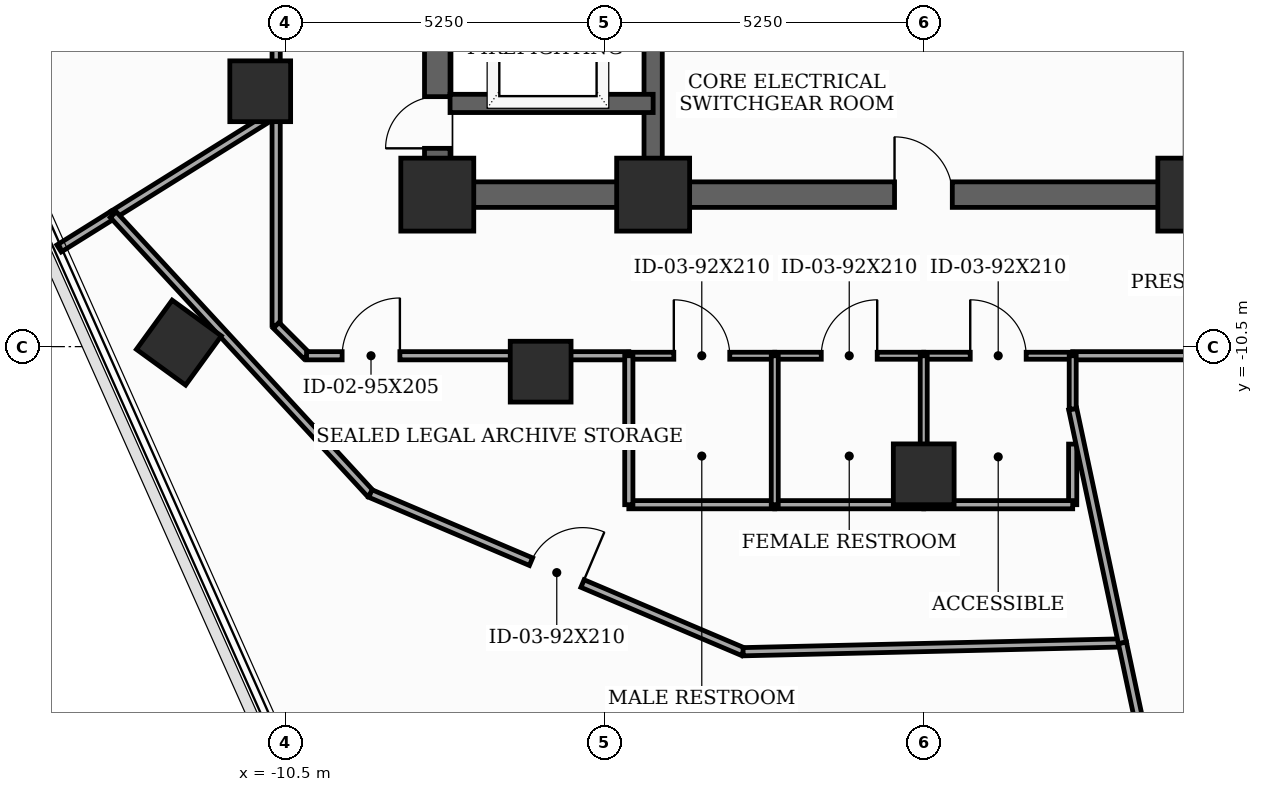
"""IFC4 building model, lengths in metres.
Left out: names, types, materials, properties, quantities, classifications, styles, units other than length and angle.
Written with IfcOpenShell. Run it as: python <this file> out.ifc"""

import sys

from ifc_helpers import new_model, si_unit, direction, frame, frame_2d, origin, origin_2d, place, context, subcontext, project, spatial, rectangle, extrude, element, fill, save


model = new_model("IFC4")
c1 = context("Model", 3, precision=1e-05, world=origin(), true_north=direction((0.0, 1.0)))
c2 = subcontext(c1, "Body", "Model", "MODEL_VIEW")
j1 = project(units=[si_unit("LENGTHUNIT", "METRE"), si_unit("PLANEANGLEUNIT", "RADIAN")], contexts=[c1])
p1 = place(None, origin())
s1 = spatial("IfcSite", under=j1, at=p1, CompositionType="ELEMENT")
p2 = place(p1, origin())
s2 = spatial("IfcBuilding", under=s1, at=p2, CompositionType="ELEMENT")
p3 = place(p2, frame((0.0, 0.0, 222.6)))
s3 = spatial("IfcBuildingStorey", under=s2, at=p3, CompositionType="ELEMENT", Elevation=222.6)
for number, where, z_axis, x_axis in (
    (1, (-8.0, -8.0, 0.0), (0.0, 0.0, 1.0), (1.0, 0.0, 0.0)),
    (2, (-4.45, -8.0, 0.0), (0.0, 0.0, 1.0), (1.0, 0.0, 0.0)),
    (3, (4.45, -8.0, 0.0), (0.0, 0.0, 1.0), (1.0, 0.0, 0.0)),
):
    element("IfcColumn", number, at=place(p3, frame(where, z_axis=z_axis, x_axis=x_axis)), inside=s3, PredefinedType="COLUMN", context=c2, shape_type="SweptSolid", body=[
        extrude(rectangle(XDim=1.2, YDim=1.2, at=origin_2d()), origin(), (0.0, 0.0, 1.0), 3.7),
    ])
for number, where, z_axis, x_axis in (
    (4, (-10.912, -6.3, 0.0), (0.0, 0.0, 1.0), (1.0, 0.0, 0.0)),
    (5, (-6.3, -10.912, 0.0), (0.0, 0.0, 1.0), (1.0, 0.0, 0.0)),
    (6, (0.0, -12.6, 0.0), (0.0, 0.0, 1.0), (1.0, 0.0, 0.0)),
    (7, (-12.25, -10.435, 0.0), (0.0, 0.0, 1.0), (0.588, 0.809, 0.0)),
):
    element("IfcColumn", number, at=place(p3, frame(where, z_axis=z_axis, x_axis=x_axis)), inside=s3, PredefinedType="COLUMN", context=c2, shape_type="SweptSolid", body=[
        extrude(rectangle(XDim=1.0, YDim=1.0, at=origin_2d()), origin(), (0.0, 0.0, 1.0), 3.7),
    ])
p4 = place(p3, frame((-8.0, -8.0, 0.0), z_axis=(0.0, 0.0, 1.0), x_axis=(0.0, 1.0, 0.0)))
e8 = element("IfcWall", 8, at=p4, inside=s3, PredefinedType="SHEAR", context=c2, shape_type="SweptSolid", body=[
    extrude(rectangle(XDim=16.0, YDim=0.42, at=frame_2d((8.0, 0.0))), origin(), (0.0, 0.0, 1.0), 3.5),
])
p5 = place(p4, frame((0.761, 0.0, 0.0)))
e9 = element("IfcOpeningElement", 9, at=p5, cuts=e8, PredefinedType="OPENING", context=c2, shape_type="SweptSolid", body=[
    extrude(rectangle(XDim=0.85, YDim=2.02, at=frame_2d((0.425, 1.01))), frame((0.0, 0.22, 0.0), z_axis=(0.0, -1.0, 0.0), x_axis=(1.0, 0.0, 0.0)), (0.0, 0.0, 1.0), 0.44),
])
p6 = place(p4, frame((5.35, 0.0, 0.0)))
e10 = element("IfcOpeningElement", 10, at=p6, cuts=e8, PredefinedType="OPENING", context=c2, shape_type="SweptSolid", body=[
    extrude(rectangle(XDim=1.05, YDim=2.15, at=frame_2d((0.525, 1.075))), frame((0.0, 0.22, 0.0), z_axis=(0.0, -1.0, 0.0), x_axis=(1.0, 0.0, 0.0)), (0.0, 0.0, 1.0), 0.44),
])
p7 = place(p3, frame((-8.0, -8.0, 0.0), z_axis=(0.0, 0.0, 1.0), x_axis=(1.0, 0.0, 0.0)))
e11 = element("IfcWall", 11, at=p7, inside=s3, PredefinedType="SHEAR", context=c2, shape_type="SweptSolid", body=[
    extrude(rectangle(XDim=16.0, YDim=0.42, at=frame_2d((8.0, 0.0))), origin(), (0.0, 0.0, 1.0), 3.5),
])
p8 = place(p7, frame((7.52, 0.0, 0.0)))
e12 = element("IfcOpeningElement", 12, at=p8, cuts=e11, PredefinedType="OPENING", context=c2, shape_type="SweptSolid", body=[
    extrude(rectangle(XDim=0.95, YDim=2.1, at=frame_2d((0.475, 1.05))), frame((0.0, 0.22, 0.0), z_axis=(0.0, -1.0, 0.0), x_axis=(1.0, 0.0, 0.0)), (0.0, 0.0, 1.0), 0.44),
])
p9 = place(p3, frame((-4.45, -7.79, 0.0), z_axis=(0.0, 0.0, 1.0), x_axis=(0.0, 1.0, 0.0)))
e13 = element("IfcWall", 13, at=p9, inside=s3, PredefinedType="SHEAR", context=c2, shape_type="SweptSolid", body=[
    extrude(rectangle(XDim=15.58, YDim=0.3, at=frame_2d((7.79, 0.0))), origin(), (0.0, 0.0, 1.0), 3.5),
])
p10 = place(p3, frame((-7.79, -6.5, 0.0), z_axis=(0.0, 0.0, 1.0), x_axis=(1.0, 0.0, 0.0)))
e14 = element("IfcWall", 14, at=p10, inside=s3, PredefinedType="SHEAR", context=c2, shape_type="SweptSolid", body=[
    extrude(rectangle(XDim=3.34, YDim=0.3, at=frame_2d((1.67, 0.0))), origin(), (0.0, 0.0, 1.0), 3.5),
])
p11 = place(p3, frame((-10.65, -4.225, 0.0), z_axis=(0.0, 0.0, 1.0), x_axis=(0.0, -1.0, 0.0)))
e15 = element("IfcWall", 15, at=p11, inside=s3, PredefinedType="PARTITIONING", context=c2, shape_type="SweptSolid", body=[
    extrude(rectangle(XDim=2.43, YDim=0.135, at=frame_2d((1.215, 0.0))), origin(), (0.0, 0.0, 1.0), 2.885),
])
p12 = place(p3, frame((-10.65, -6.655, 0.0), z_axis=(0.0, 0.0, 1.0), x_axis=(0.0, -1.0, 0.0)))
e16 = element("IfcWall", 16, at=p12, inside=s3, PredefinedType="PARTITIONING", context=c2, shape_type="SweptSolid", body=[
    extrude(rectangle(XDim=3.495, YDim=0.135, at=frame_2d((1.748, 0.0))), origin(), (0.0, 0.0, 1.0), 2.885),
])
p13 = place(p3, frame((-10.65, -10.15, 0.0), z_axis=(0.0, 0.0, 1.0), x_axis=(0.707106781187, -0.707106781187, 0.0)))
e17 = element("IfcWall", 17, at=p13, inside=s3, PredefinedType="PARTITIONING", context=c2, shape_type="SweptSolid", body=[
    extrude(rectangle(XDim=0.707, YDim=0.135, at=frame_2d((0.354, 0.0))), origin(), (0.0, 0.0, 1.0), 2.075),
])
p14 = place(p3, frame((-10.15, -10.65, 0.0), z_axis=(0.0, 0.0, 1.0), x_axis=(1.0, 0.0, 0.0)))
e18 = element("IfcWall", 18, at=p14, inside=s3, PredefinedType="PARTITIONING", context=c2, shape_type="SweptSolid", body=[
    extrude(rectangle(XDim=5.3, YDim=0.135, at=frame_2d((2.65, 0.0))), origin(), (0.0, 0.0, 1.0), 2.075),
])
p15 = place(p14, frame((0.585, 0.0, 0.0)))
e19 = element("IfcOpeningElement", 19, at=p15, cuts=e18, PredefinedType="OPENING", context=c2, shape_type="SweptSolid", body=[
    extrude(rectangle(XDim=0.95, YDim=2.025, at=frame_2d((0.475, 1.012))), frame((0.0, 0.077, 0.0), z_axis=(0.0, -1.0, 0.0), x_axis=(1.0, 0.0, 0.0)), (0.0, 0.0, 1.0), 0.155),
])
p16 = place(p3, frame((-4.85, -10.65, 0.0), z_axis=(0.0, 0.0, 1.0), x_axis=(1.0, 0.0, 0.0)))
e20 = element("IfcWall", 20, at=p16, inside=s3, PredefinedType="PARTITIONING", context=c2, shape_type="SweptSolid", body=[
    extrude(rectangle(XDim=2.4, YDim=0.115, at=frame_2d((1.2, 0.0))), origin(), (0.0, 0.0, 1.0), 3.5),
])
p17 = place(p16, frame((0.74, 0.0, 0.0)))
e21 = element("IfcOpeningElement", 21, at=p17, cuts=e20, PredefinedType="OPENING", context=c2, shape_type="SweptSolid", body=[
    extrude(rectangle(XDim=0.92, YDim=2.1, at=frame_2d((0.46, 1.05))), frame((0.0, 0.067, 0.0), z_axis=(0.0, -1.0, 0.0), x_axis=(1.0, 0.0, 0.0)), (0.0, 0.0, 1.0), 0.135),
])
p18 = place(p3, frame((-2.45, -10.65, 0.0), z_axis=(0.0, 0.0, 1.0), x_axis=(1.0, 0.0, 0.0)))
e22 = element("IfcWall", 22, at=p18, inside=s3, PredefinedType="PARTITIONING", context=c2, shape_type="SweptSolid", body=[
    extrude(rectangle(XDim=2.45, YDim=0.115, at=frame_2d((1.225, 0.0))), origin(), (0.0, 0.0, 1.0), 2.885),
])
p19 = place(p18, frame((0.765, 0.0, 0.0)))
e23 = element("IfcOpeningElement", 23, at=p19, cuts=e22, PredefinedType="OPENING", context=c2, shape_type="SweptSolid", body=[
    extrude(rectangle(XDim=0.92, YDim=2.1, at=frame_2d((0.46, 1.05))), frame((0.0, 0.067, 0.0), z_axis=(0.0, -1.0, 0.0), x_axis=(1.0, 0.0, 0.0)), (0.0, 0.0, 1.0), 0.135),
])
p20 = place(p3, frame((0.0, -10.65, 0.0), z_axis=(0.0, 0.0, 1.0), x_axis=(1.0, 0.0, 0.0)))
e24 = element("IfcWall", 24, at=p20, inside=s3, PredefinedType="PARTITIONING", context=c2, shape_type="SweptSolid", body=[
    extrude(rectangle(XDim=2.45, YDim=0.115, at=frame_2d((1.225, 0.0))), origin(), (0.0, 0.0, 1.0), 3.5),
])
p21 = place(p20, frame((0.765, 0.0, 0.0)))
e25 = element("IfcOpeningElement", 25, at=p21, cuts=e24, PredefinedType="OPENING", context=c2, shape_type="SweptSolid", body=[
    extrude(rectangle(XDim=0.92, YDim=2.1, at=frame_2d((0.46, 1.05))), frame((0.0, 0.067, 0.0), z_axis=(0.0, -1.0, 0.0), x_axis=(1.0, 0.0, 0.0)), (0.0, 0.0, 1.0), 0.135),
])
p22 = place(p3, frame((2.45, -10.65, 0.0), z_axis=(0.0, 0.0, 1.0), x_axis=(1.0, 0.0, 0.0)))
e26 = element("IfcWall", 26, at=p22, inside=s3, PredefinedType="PARTITIONING", context=c2, shape_type="SweptSolid", body=[
    extrude(rectangle(XDim=7.7, YDim=0.135, at=frame_2d((3.85, 0.0))), origin(), (0.0, 0.0, 1.0), 2.885),
])
p23 = place(p3, frame((-13.329, -8.329, 0.0), z_axis=(0.0, 0.0, 1.0), x_axis=(0.848059079617, 0.529901686617, 0.0)))
e27 = element("IfcWall", 27, at=p23, inside=s3, PredefinedType="PARTITIONING", context=c2, shape_type="SweptSolid", body=[
    extrude(rectangle(XDim=3.159, YDim=0.135, at=frame_2d((1.58, 0.0))), origin(), (0.0, 0.0, 1.0), 2.885),
])
p24 = place(p3, frame((-14.22, -8.885, 0.0), z_axis=(0.0, 0.0, 1.0), x_axis=(0.848337621773, 0.529455644493, 0.0)))
e28 = element("IfcWall", 28, at=p24, inside=s3, PredefinedType="PARTITIONING", context=c2, shape_type="SweptSolid", body=[
    extrude(rectangle(XDim=1.051, YDim=0.135, at=frame_2d((0.525, 0.0))), origin(), (0.0, 0.0, 1.0), 3.025),
])
p25 = place(p3, frame((-2.45, -13.1, 0.0), z_axis=(0.0, 0.0, 1.0), x_axis=(-1.0, 0.0, 0.0)))
e29 = element("IfcWall", 29, at=p25, inside=s3, PredefinedType="PARTITIONING", context=c2, shape_type="SweptSolid", body=[
    extrude(rectangle(XDim=2.4, YDim=0.135, at=frame_2d((1.2, 0.0))), origin(), (0.0, 0.0, 1.0), 3.5),
])
p26 = place(p3, frame((-4.85, -13.1, 0.0), z_axis=(0.0, 0.0, 1.0), x_axis=(0.0, 1.0, 0.0)))
e30 = element("IfcWall", 30, at=p26, inside=s3, PredefinedType="PARTITIONING", context=c2, shape_type="SweptSolid", body=[
    extrude(rectangle(XDim=2.45, YDim=0.135, at=frame_2d((1.225, 0.0))), origin(), (0.0, 0.0, 1.0), 2.885),
])
p27 = place(p3, frame((-13.329, -8.329, 0.0), z_axis=(0.0, 0.0, 1.0), x_axis=(0.677841155448, -0.735208384052, 0.0)))
e31 = element("IfcWall", 31, at=p27, inside=s3, PredefinedType="PARTITIONING", context=c2, shape_type="SweptSolid", body=[
    extrude(rectangle(XDim=6.239, YDim=0.135, at=frame_2d((3.12, 0.0))), origin(), (0.0, 0.0, 1.0), 2.075),
])
p28 = place(p3, frame((-9.1, -12.916, 0.0), z_axis=(0.0, 0.0, 1.0), x_axis=(0.920506675175, -0.390726836752, 0.0)))
e32 = element("IfcWall", 32, at=p28, inside=s3, PredefinedType="PARTITIONING", context=c2, shape_type="SweptSolid", body=[
    extrude(rectangle(XDim=6.659, YDim=0.135, at=frame_2d((3.33, 0.0))), origin(), (0.0, 0.0, 1.0), 2.985),
])
p29 = place(p28, frame((2.87, 0.0, 0.0)))
e33 = element("IfcOpeningElement", 33, at=p29, cuts=e32, PredefinedType="OPENING", context=c2, shape_type="SweptSolid", body=[
    extrude(rectangle(XDim=0.92, YDim=2.1, at=frame_2d((0.46, 1.05))), frame((0.0, 0.077, 0.0), z_axis=(0.0, -1.0, 0.0), x_axis=(1.0, 0.0, 0.0)), (0.0, 0.0, 1.0), 0.155),
])
p30 = place(p3, frame((-2.97, -15.518, 0.0), z_axis=(0.0, 0.0, 1.0), x_axis=(0.99972988351, 0.023241342836, 0.0)))
e34 = element("IfcWall", 34, at=p30, inside=s3, PredefinedType="PARTITIONING", context=c2, shape_type="SweptSolid", body=[
    extrude(rectangle(XDim=6.24, YDim=0.135, at=frame_2d((3.12, 0.0))), origin(), (0.0, 0.0, 1.0), 2.985),
])
p31 = place(p3, frame((0.0, -13.1, 0.0), z_axis=(0.0, 0.0, 1.0), x_axis=(-1.0, 0.0, 0.0)))
e35 = element("IfcWall", 35, at=p31, inside=s3, PredefinedType="PARTITIONING", context=c2, shape_type="SweptSolid", body=[
    extrude(rectangle(XDim=2.45, YDim=0.135, at=frame_2d((1.225, 0.0))), origin(), (0.0, 0.0, 1.0), 3.5),
])
p32 = place(p3, frame((2.45, -12.103, 0.0), z_axis=(0.0, 0.0, 1.0), x_axis=(0.0, -1.0, 0.0)))
e36 = element("IfcWall", 36, at=p32, inside=s3, PredefinedType="PARTITIONING", context=c2, shape_type="SweptSolid", body=[
    extrude(rectangle(XDim=0.997, YDim=0.135, at=frame_2d((0.499, 0.0))), origin(), (0.0, 0.0, 1.0), 2.885),
])
p33 = place(p3, frame((2.45, -13.1, 0.0), z_axis=(0.0, 0.0, 1.0), x_axis=(-1.0, 0.0, 0.0)))
e37 = element("IfcWall", 37, at=p33, inside=s3, PredefinedType="PARTITIONING", context=c2, shape_type="SweptSolid", body=[
    extrude(rectangle(XDim=2.45, YDim=0.135, at=frame_2d((1.225, 0.0))), origin(), (0.0, 0.0, 1.0), 2.985),
])
p34 = place(p3, frame((3.268, -15.373, 0.0), z_axis=(0.0, 0.0, 1.0), x_axis=(-0.208002774368, 0.978128235895, 0.0)))
e38 = element("IfcWall", 38, at=p34, inside=s3, PredefinedType="PARTITIONING", context=c2, shape_type="SweptSolid", body=[
    extrude(rectangle(XDim=3.933, YDim=0.135, at=frame_2d((1.967, 0.0))), origin(), (0.0, 0.0, 1.0), 2.885),
])
p35 = place(p3, frame((-2.45, -13.1, 0.0), z_axis=(0.0, 0.0, 1.0), x_axis=(0.0, 1.0, 0.0)))
e39 = element("IfcWall", 39, at=p35, inside=s3, PredefinedType="PARTITIONING", context=c2, shape_type="SweptSolid", body=[
    extrude(rectangle(XDim=2.45, YDim=0.115, at=frame_2d((1.225, 0.0))), origin(), (0.0, 0.0, 1.0), 2.885),
])
p36 = place(p3, frame((4.645, -21.856, 0.0), z_axis=(0.0, 0.0, 1.0), x_axis=(-0.207797956892, 0.978171768715, 0.0)))
e40 = element("IfcWall", 40, at=p36, inside=s3, PredefinedType="PARTITIONING", context=c2, shape_type="SweptSolid", body=[
    extrude(rectangle(XDim=6.628, YDim=0.135, at=frame_2d((3.314, 0.0))), origin(), (0.0, 0.0, 1.0), 2.985),
])
p37 = place(p3, frame((0.0, -13.1, 0.0), z_axis=(0.0, 0.0, 1.0), x_axis=(0.0, 1.0, 0.0)))
e41 = element("IfcWall", 41, at=p37, inside=s3, PredefinedType="PARTITIONING", context=c2, shape_type="SweptSolid", body=[
    extrude(rectangle(XDim=2.45, YDim=0.115, at=frame_2d((1.225, 0.0))), origin(), (0.0, 0.0, 1.0), 2.885),
])
p38 = place(p3, frame((2.45, -11.526, 0.0), z_axis=(0.0, 0.0, 1.0), x_axis=(0.0, 1.0, 0.0)))
e42 = element("IfcWall", 42, at=p38, inside=s3, PredefinedType="PARTITIONING", context=c2, shape_type="SweptSolid", body=[
    extrude(rectangle(XDim=0.876, YDim=0.115, at=frame_2d((0.438, 0.0))), origin(), (0.0, 0.0, 1.0), 3.5),
])
p39 = place(p5, origin())
e43 = element("IfcDoor", 43, at=p39, inside=s3, OperationType="SINGLE_SWING_LEFT", PredefinedType="TRAPDOOR", context=c2, shape_type="SweptSolid", body=[
    extrude(rectangle(XDim=0.85, YDim=2.02, at=frame_2d((0.425, 1.01))), frame((0.0, 0.025, 0.0), z_axis=(0.0, -1.0, 0.0), x_axis=(1.0, 0.0, 0.0)), (0.0, 0.0, 1.0), 0.05),
])
fill(e9, e43)
p40 = place(p8, origin())
e44 = element("IfcDoor", 44, at=p40, inside=s3, OperationType="SINGLE_SWING_LEFT", PredefinedType="DOOR", context=c2, shape_type="SweptSolid", body=[
    extrude(rectangle(XDim=0.95, YDim=2.1, at=frame_2d((0.475, 1.05))), frame((0.0, 0.025, 0.0), z_axis=(0.0, -1.0, 0.0), x_axis=(1.0, 0.0, 0.0)), (0.0, 0.0, 1.0), 0.05),
])
fill(e12, e44)
p41 = place(p15, origin())
e45 = element("IfcDoor", 45, at=p41, inside=s3, OperationType="SINGLE_SWING_RIGHT", PredefinedType="DOOR", context=c2, shape_type="SweptSolid", body=[
    extrude(rectangle(XDim=0.95, YDim=2.025, at=frame_2d((0.475, 1.012))), frame((0.0, 0.025, 0.0), z_axis=(0.0, -1.0, 0.0), x_axis=(1.0, 0.0, 0.0)), (0.0, 0.0, 1.0), 0.05),
])
fill(e19, e45)
p42 = place(p17, origin())
e46 = element("IfcDoor", 46, at=p42, inside=s3, OperationType="SINGLE_SWING_LEFT", PredefinedType="DOOR", context=c2, shape_type="SweptSolid", body=[
    extrude(rectangle(XDim=0.92, YDim=2.1, at=frame_2d((0.46, 1.05))), frame((0.0, 0.025, 0.0), z_axis=(0.0, -1.0, 0.0), x_axis=(1.0, 0.0, 0.0)), (0.0, 0.0, 1.0), 0.05),
])
fill(e21, e46)
p43 = place(p19, origin())
e47 = element("IfcDoor", 47, at=p43, inside=s3, OperationType="SINGLE_SWING_RIGHT", PredefinedType="DOOR", context=c2, shape_type="SweptSolid", body=[
    extrude(rectangle(XDim=0.92, YDim=2.1, at=frame_2d((0.46, 1.05))), frame((0.0, 0.025, 0.0), z_axis=(0.0, -1.0, 0.0), x_axis=(1.0, 0.0, 0.0)), (0.0, 0.0, 1.0), 0.05),
])
fill(e23, e47)
p44 = place(p21, origin())
e48 = element("IfcDoor", 48, at=p44, inside=s3, OperationType="SINGLE_SWING_LEFT", PredefinedType="DOOR", context=c2, shape_type="SweptSolid", body=[
    extrude(rectangle(XDim=0.92, YDim=2.1, at=frame_2d((0.46, 1.05))), frame((0.0, 0.025, 0.0), z_axis=(0.0, -1.0, 0.0), x_axis=(1.0, 0.0, 0.0)), (0.0, 0.0, 1.0), 0.05),
])
fill(e25, e48)
p45 = place(p29, origin())
e49 = element("IfcDoor", 49, at=p45, inside=s3, OperationType="SINGLE_SWING_RIGHT", PredefinedType="DOOR", context=c2, shape_type="SweptSolid", body=[
    extrude(rectangle(XDim=0.92, YDim=2.1, at=frame_2d((0.46, 1.05))), frame((0.0, 0.025, 0.0), z_axis=(0.0, -1.0, 0.0), x_axis=(1.0, 0.0, 0.0)), (0.0, 0.0, 1.0), 0.05),
])
fill(e33, e49)
save(model, sys.argv[1])
